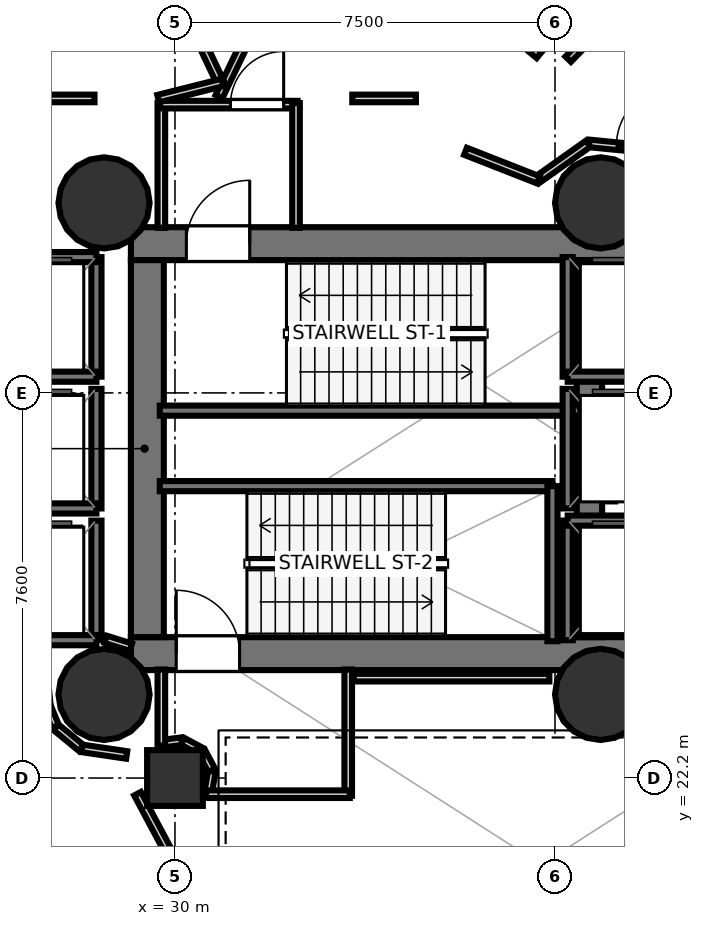
"""IFC4 building model, lengths in metres.
Left out: names, types, materials, properties, quantities, classifications, styles, units other than length and angle.
Written with IfcOpenShell. Run it as: python <this file> out.ifc"""

import sys

from ifc_helpers import new_model, si_unit, direction, frame, frame_2d, origin, origin_2d, place, context, subcontext, project, spatial, rectangle, hollow_circle, extrude, element, fill, save


model = new_model("IFC4")
c1 = context("Model", 3, precision=1e-05, world=origin(), true_north=direction((0.0, 1.0)))
c2 = subcontext(c1, "Body", "Model", "MODEL_VIEW")
j1 = project(units=[si_unit("LENGTHUNIT", "METRE"), si_unit("PLANEANGLEUNIT", "RADIAN")], contexts=[c1])
p1 = place(None, origin())
s1 = spatial("IfcSite", under=j1, at=p1, CompositionType="ELEMENT")
p2 = place(p1, origin())
s2 = spatial("IfcBuilding", under=s1, at=p2, CompositionType="ELEMENT")
p3 = place(p2, frame((0.0, 0.0, 6.0)))
s3 = spatial("IfcBuildingStorey", under=s2, at=p3, CompositionType="ELEMENT", Elevation=6.0)
p4 = place(p3, frame((29.13, 32.745, 0.0), z_axis=(0.0, 0.0, 1.0), x_axis=(1.0, 0.0, 0.0)))
e1 = element("IfcWall", 1, at=p4, inside=s3, PredefinedType="SHEAR", context=c2, shape_type="SweptSolid", body=[
    extrude(rectangle(XDim=10.72, YDim=0.65, at=frame_2d((5.36, 0.0))), origin(), (0.0, 0.0, 1.0), 4.78),
])
p5 = place(p4, frame((1.095, 0.0, 0.0)))
e2 = element("IfcOpeningElement", 2, at=p5, cuts=e1, PredefinedType="OPENING", context=c2, shape_type="SweptSolid", body=[
    extrude(rectangle(XDim=1.25, YDim=2.15, at=frame_2d((0.625, 1.075))), frame((0.0, 0.335, 0.0), z_axis=(0.0, -1.0, 0.0), x_axis=(1.0, 0.0, 0.0)), (0.0, 0.0, 1.0), 0.67),
])
p6 = place(p3, frame((29.13, 24.655, 0.0), z_axis=(0.0, 0.0, 1.0), x_axis=(1.0, 0.0, 0.0)))
e3 = element("IfcWall", 3, at=p6, inside=s3, PredefinedType="SHEAR", context=c2, shape_type="SweptSolid", body=[
    extrude(rectangle(XDim=10.72, YDim=0.65, at=frame_2d((5.36, 0.0))), origin(), (0.0, 0.0, 1.0), 4.78),
])
p7 = place(p6, frame((0.895, 0.0, 0.0)))
e4 = element("IfcOpeningElement", 4, at=p7, cuts=e3, PredefinedType="OPENING", context=c2, shape_type="SweptSolid", body=[
    extrude(rectangle(XDim=1.25, YDim=2.15, at=frame_2d((0.625, 1.075))), frame((0.0, 0.335, 0.0), z_axis=(0.0, -1.0, 0.0), x_axis=(1.0, 0.0, 0.0)), (0.0, 0.0, 1.0), 0.67),
])
p8 = place(p3, frame((29.455, 24.98, 0.0), z_axis=(0.0, 0.0, 1.0), x_axis=(0.0, 1.0, 0.0)))
e5 = element("IfcWall", 5, at=p8, inside=s3, PredefinedType="SHEAR", context=c2, shape_type="SweptSolid", body=[
    extrude(rectangle(XDim=7.44, YDim=0.65, at=frame_2d((3.72, 0.0))), origin(), (0.0, 0.0, 1.0), 4.78),
])
p9 = place(p3, frame((38.18, 24.98, 0.0), z_axis=(0.0, 0.0, 1.0), x_axis=(0.0, 1.0, 0.0)))
e6 = element("IfcWall", 6, at=p9, inside=s3, PredefinedType="SHEAR", context=c2, shape_type="SweptSolid", body=[
    extrude(rectangle(XDim=7.44, YDim=0.5, at=frame_2d((3.72, 0.0))), origin(), (0.0, 0.0, 1.0), 4.78),
])
for number, where, z_axis, x_axis in (
    (7, (28.6, 33.55, 0.0), (0.0, 0.0, 1.0), (1.0, 0.0, 0.0)),
    (8, (28.6, 23.85, 0.0), (0.0, 0.0, 1.0), (1.0, 0.0, 0.0)),
    (9, (38.4, 33.55, 0.0), (0.0, 0.0, 1.0), (1.0, 0.0, 0.0)),
    (10, (38.4, 23.85, 0.0), (0.0, 0.0, 1.0), (1.0, 0.0, 0.0)),
):
    element("IfcColumn", number, at=place(p3, frame(where, z_axis=z_axis, x_axis=x_axis)), inside=s3, PredefinedType="COLUMN", context=c2, shape_type="SweptSolid", body=[
        extrude(hollow_circle(Radius=0.9, WallThickness=0.045, at=origin_2d()), origin(), (0.0, 0.0, 1.0), 5.0),
    ])
p10 = place(p3, frame((30.0, 22.2, 0.0), z_axis=(0.0, 0.0, 1.0), x_axis=(1.0, 0.0, 0.0)))
e11 = element("IfcColumn", 11, at=p10, inside=s3, PredefinedType="COLUMN", context=c2, shape_type="SweptSolid", body=[
    extrude(rectangle(XDim=1.1, YDim=1.1, at=origin_2d()), origin(), (0.0, 0.0, 1.0), 5.0),
])
p11 = place(p3, frame((29.7, 29.45, 0.0), z_axis=(0.0, 0.0, 1.0), x_axis=(1.0, 0.0, 0.0)))
e12 = element("IfcWall", 12, at=p11, inside=s3, PredefinedType="SOLIDWALL", context=c2, shape_type="SweptSolid", body=[
    extrude(rectangle(XDim=8.3, YDim=0.2, at=frame_2d((4.15, 0.0))), origin(), (0.0, 0.0, 1.0), 4.78),
])
p12 = place(p3, frame((29.7, 27.96, 0.0), z_axis=(0.0, 0.0, 1.0), x_axis=(1.0, 0.0, 0.0)))
e13 = element("IfcWall", 13, at=p12, inside=s3, PredefinedType="SOLIDWALL", context=c2, shape_type="SweptSolid", body=[
    extrude(rectangle(XDim=7.75, YDim=0.2, at=frame_2d((3.875, 0.0))), origin(), (0.0, 0.0, 1.0), 4.78),
])
p13 = place(p3, frame((37.45, 24.9, 0.0), z_axis=(0.0, 0.0, 1.0), x_axis=(0.0, 1.0, 0.0)))
e14 = element("IfcWall", 14, at=p13, inside=s3, PredefinedType="SOLIDWALL", context=c2, shape_type="SweptSolid", body=[
    extrude(rectangle(XDim=3.06, YDim=0.2, at=frame_2d((1.53, 0.0))), origin(), (0.0, 0.0, 1.0), 4.78),
])
p14 = place(p3, frame((37.75, 30.12, 0.0), z_axis=(0.0, 0.0, 1.0), x_axis=(0.0, 1.0, 0.0)))
e15 = element("IfcWall", 15, at=p14, inside=s3, PredefinedType="SOLIDWALL", context=c2, shape_type="SweptSolid", body=[
    extrude(rectangle(XDim=2.36, YDim=0.2, at=frame_2d((1.18, 0.0))), origin(), (0.0, 0.0, 1.0), 4.78),
])
p15 = place(p3, frame((37.75, 30.12, 0.0), z_axis=(0.0, 0.0, 1.0), x_axis=(1.0, 0.0, 0.0)))
e16 = element("IfcWall", 16, at=p15, inside=s3, PredefinedType="SOLIDWALL", context=c2, shape_type="SweptSolid", body=[
    extrude(rectangle(XDim=2.1, YDim=0.2, at=frame_2d((1.05, 0.0))), origin(), (0.0, 0.0, 1.0), 4.78),
])
p16 = place(p3, frame((37.75, 24.92, 0.0), z_axis=(0.0, 0.0, 1.0), x_axis=(0.0, 1.0, 0.0)))
e17 = element("IfcWall", 17, at=p16, inside=s3, PredefinedType="SOLIDWALL", context=c2, shape_type="SweptSolid", body=[
    extrude(rectangle(XDim=2.36, YDim=0.2, at=frame_2d((1.18, 0.0))), origin(), (0.0, 0.0, 1.0), 4.78),
])
p17 = place(p3, frame((37.75, 27.28, 0.0), z_axis=(0.0, 0.0, 1.0), x_axis=(1.0, 0.0, 0.0)))
e18 = element("IfcWall", 18, at=p17, inside=s3, PredefinedType="SOLIDWALL", context=c2, shape_type="SweptSolid", body=[
    extrude(rectangle(XDim=2.1, YDim=0.2, at=frame_2d((1.05, 0.0))), origin(), (0.0, 0.0, 1.0), 4.78),
])
p18 = place(p3, frame((28.45, 30.12, 0.0), z_axis=(0.0, 0.0, 1.0), x_axis=(0.0, 1.0, 0.0)))
e19 = element("IfcWall", 19, at=p18, inside=s3, PredefinedType="SOLIDWALL", context=c2, shape_type="SweptSolid", body=[
    extrude(rectangle(XDim=2.36, YDim=0.2, at=frame_2d((1.18, 0.0))), origin(), (0.0, 0.0, 1.0), 4.78),
])
for number, where, z_axis, x_axis in (
    (20, (26.35, 32.48, 0.0), (0.0, 0.0, 1.0), (1.0, 0.0, 0.0)),
    (21, (26.35, 30.12, 0.0), (0.0, 0.0, 1.0), (1.0, 0.0, 0.0)),
):
    element("IfcWall", number, at=place(p3, frame(where, z_axis=z_axis, x_axis=x_axis)), inside=s3, PredefinedType="SOLIDWALL", context=c2, shape_type="SweptSolid", body=[
        extrude(rectangle(XDim=2.1, YDim=0.2, at=frame_2d((1.05, 0.0))), origin(), (0.0, 0.0, 1.0), 4.78),
    ])
p19 = place(p3, frame((28.45, 27.52, 0.0), z_axis=(0.0, 0.0, 1.0), x_axis=(0.0, 1.0, 0.0)))
e22 = element("IfcWall", 22, at=p19, inside=s3, PredefinedType="SOLIDWALL", context=c2, shape_type="SweptSolid", body=[
    extrude(rectangle(XDim=2.36, YDim=0.2, at=frame_2d((1.18, 0.0))), origin(), (0.0, 0.0, 1.0), 4.78),
])
p20 = place(p3, frame((26.35, 27.52, 0.0), z_axis=(0.0, 0.0, 1.0), x_axis=(1.0, 0.0, 0.0)))
e23 = element("IfcWall", 23, at=p20, inside=s3, PredefinedType="SOLIDWALL", context=c2, shape_type="SweptSolid", body=[
    extrude(rectangle(XDim=2.1, YDim=0.2, at=frame_2d((1.05, 0.0))), origin(), (0.0, 0.0, 1.0), 4.78),
])
p21 = place(p3, frame((28.45, 24.92, 0.0), z_axis=(0.0, 0.0, 1.0), x_axis=(0.0, 1.0, 0.0)))
e24 = element("IfcWall", 24, at=p21, inside=s3, PredefinedType="SOLIDWALL", context=c2, shape_type="SweptSolid", body=[
    extrude(rectangle(XDim=2.36, YDim=0.2, at=frame_2d((1.18, 0.0))), origin(), (0.0, 0.0, 1.0), 4.78),
])
p22 = place(p3, frame((26.35, 24.92, 0.0), z_axis=(0.0, 0.0, 1.0), x_axis=(1.0, 0.0, 0.0)))
e25 = element("IfcWall", 25, at=p22, inside=s3, PredefinedType="SOLIDWALL", context=c2, shape_type="SweptSolid", body=[
    extrude(rectangle(XDim=2.1, YDim=0.2, at=frame_2d((1.05, 0.0))), origin(), (0.0, 0.0, 1.0), 4.78),
])
p23 = place(p3, frame((37.75, 27.52, 0.0), z_axis=(0.0, 0.0, 1.0), x_axis=(0.0, 1.0, 0.0)))
e26 = element("IfcWall", 26, at=p23, inside=s3, PredefinedType="SOLIDWALL", context=c2, shape_type="SweptSolid", body=[
    extrude(rectangle(XDim=2.36, YDim=0.2, at=frame_2d((1.18, 0.0))), origin(), (0.0, 0.0, 1.0), 4.78),
])
p24 = place(p3, frame((29.731, 33.058, 0.0), z_axis=(0.0, 0.0, 1.0), x_axis=(0.0, 1.0, 0.0)))
e27 = element("IfcWall", 27, at=p24, inside=s3, PredefinedType="PARTITIONING", context=c2, shape_type="SweptSolid", body=[
    extrude(rectangle(XDim=2.462, YDim=0.15, at=frame_2d((1.231, 0.0))), origin(), (0.0, 0.0, 1.0), 4.1),
])
p25 = place(p3, frame((29.7, 35.489, 0.0), z_axis=(0.0, 0.0, 1.0), x_axis=(1.0, 0.0, 0.0)))
e28 = element("IfcWall", 28, at=p25, inside=s3, PredefinedType="PARTITIONING", context=c2, shape_type="SweptSolid", body=[
    extrude(rectangle(XDim=2.72, YDim=0.15, at=frame_2d((1.36, 0.0))), origin(), (0.0, 0.0, 1.0), 4.1),
])
p26 = place(p25, frame((1.395, 0.0, 0.0)))
e29 = element("IfcOpeningElement", 29, at=p26, cuts=e28, PredefinedType="OPENING", context=c2, shape_type="SweptSolid", body=[
    extrude(rectangle(XDim=1.05, YDim=2.15, at=frame_2d((0.525, 1.075))), frame((0.0, 0.085, 0.0), z_axis=(0.0, -1.0, 0.0), x_axis=(1.0, 0.0, 0.0)), (0.0, 0.0, 1.0), 0.17),
])
p27 = place(p3, frame((32.389, 35.52, 0.0), z_axis=(0.0, 0.0, 1.0), x_axis=(0.0, -1.0, 0.0)))
e30 = element("IfcWall", 30, at=p27, inside=s3, PredefinedType="PARTITIONING", context=c2, shape_type="SweptSolid", body=[
    extrude(rectangle(XDim=2.462, YDim=0.15, at=frame_2d((1.231, 0.0))), origin(), (0.0, 0.0, 1.0), 4.1),
])
p28 = place(p3, frame((30.645, 21.845, 0.0), z_axis=(0.0, 0.0, 1.0), x_axis=(0.16559769087, 0.986193391165, 0.0)))
e31 = element("IfcWall", 31, at=p28, inside=s3, PredefinedType="PARTITIONING", context=c2, shape_type="SweptSolid", body=[
    extrude(rectangle(XDim=0.495, YDim=0.15, at=frame_2d((0.248, 0.0))), origin(), (0.0, 0.0, 1.0), 4.1),
])
p29 = place(p3, frame((30.724, 22.353, 0.0), z_axis=(0.0, 0.0, 1.0), x_axis=(-0.471202615726, 0.882024996773, 0.0)))
e32 = element("IfcWall", 32, at=p29, inside=s3, PredefinedType="PARTITIONING", context=c2, shape_type="SweptSolid", body=[
    extrude(rectangle(XDim=0.412, YDim=0.15, at=frame_2d((0.206, 0.0))), origin(), (0.0, 0.0, 1.0), 4.1),
])
p30 = place(p3, frame((30.517, 22.729, 0.0), z_axis=(0.0, 0.0, 1.0), x_axis=(-0.882139655073, 0.470987928665, 0.0)))
e33 = element("IfcWall", 33, at=p30, inside=s3, PredefinedType="PARTITIONING", context=c2, shape_type="SweptSolid", body=[
    extrude(rectangle(XDim=0.412, YDim=0.15, at=frame_2d((0.206, 0.0))), origin(), (0.0, 0.0, 1.0), 4.1),
])
p31 = place(p3, frame((30.135, 22.927, 0.0), z_axis=(0.0, 0.0, 1.0), x_axis=(-0.992106976416, -0.125394367286, 0.0)))
e34 = element("IfcWall", 34, at=p31, inside=s3, PredefinedType="PARTITIONING", context=c2, shape_type="SweptSolid", body=[
    extrude(rectangle(XDim=0.442, YDim=0.15, at=frame_2d((0.221, 0.0))), origin(), (0.0, 0.0, 1.0), 4.1),
])
p32 = place(p3, frame((29.731, 22.841, 0.0), z_axis=(0.0, 0.0, 1.0), x_axis=(0.0, 1.0, 0.0)))
e35 = element("IfcWall", 35, at=p32, inside=s3, PredefinedType="PARTITIONING", context=c2, shape_type="SweptSolid", body=[
    extrude(rectangle(XDim=1.501, YDim=0.15, at=frame_2d((0.75, 0.0))), origin(), (0.0, 0.0, 1.0), 4.1),
])
p33 = place(p3, frame((33.419, 24.342, 0.0), z_axis=(0.0, 0.0, 1.0), x_axis=(0.0, -1.0, 0.0)))
e36 = element("IfcWall", 36, at=p33, inside=s3, PredefinedType="PARTITIONING", context=c2, shape_type="SweptSolid", body=[
    extrude(rectangle(XDim=2.492, YDim=0.15, at=frame_2d((1.246, 0.0))), origin(), (0.0, 0.0, 1.0), 4.1),
])
p34 = place(p3, frame((33.45, 21.881, 0.0), z_axis=(0.0, 0.0, 1.0), x_axis=(-1.0, 0.0, 0.0)))
e37 = element("IfcWall", 37, at=p34, inside=s3, PredefinedType="PARTITIONING", context=c2, shape_type="SweptSolid", body=[
    extrude(rectangle(XDim=2.836, YDim=0.15, at=frame_2d((1.418, 0.0))), origin(), (0.0, 0.0, 1.0), 4.1),
])
p35 = place(p3, frame((29.13, 24.782, 0.0), z_axis=(0.0, 0.0, 1.0), x_axis=(-0.955000482512, 0.296604245422, 0.0)))
e38 = element("IfcWall", 38, at=p35, inside=s3, PredefinedType="PARTITIONING", context=c2, shape_type="SweptSolid", body=[
    extrude(rectangle(XDim=0.524, YDim=0.15, at=frame_2d((0.262, 0.0))), origin(), (0.0, 0.0, 1.0), 4.1),
])
p36 = place(p3, frame((37.389, 24.181, 0.0), z_axis=(0.0, 0.0, 1.0), x_axis=(-1.0, 0.0, 0.0)))
e39 = element("IfcWall", 39, at=p36, inside=s3, PredefinedType="PARTITIONING", context=c2, shape_type="SweptSolid", body=[
    extrude(rectangle(XDim=3.859, YDim=0.15, at=frame_2d((1.929, 0.0))), origin(), (0.0, 0.0, 1.0), 4.1),
])
p37 = place(p3, frame((36.84, 36.748, 0.0), z_axis=(0.0, 0.0, 1.0), x_axis=(0.773032183029, -0.634366805564, 0.0)))
e40 = element("IfcWall", 40, at=p37, inside=s3, PredefinedType="PARTITIONING", context=c2, shape_type="SweptSolid", body=[
    extrude(rectangle(XDim=0.447, YDim=0.15, at=frame_2d((0.224, 0.0))), origin(), (0.0, 0.0, 1.0), 4.1),
])
p38 = place(p3, frame((37.76, 36.385, 0.0), z_axis=(0.0, 0.0, 1.0), x_axis=(0.698452825949, 0.715656097524, 0.0)))
e41 = element("IfcWall", 41, at=p38, inside=s3, PredefinedType="PARTITIONING", context=c2, shape_type="SweptSolid", body=[
    extrude(rectangle(XDim=0.922, YDim=0.15, at=frame_2d((0.461, 0.0))), origin(), (0.0, 0.0, 1.0), 4.1),
])
p39 = place(p3, frame((39.821, 34.561, 0.0), z_axis=(0.0, 0.0, 1.0), x_axis=(-0.995195288054, 0.09790984953, 0.0)))
e42 = element("IfcWall", 42, at=p39, inside=s3, PredefinedType="PARTITIONING", context=c2, shape_type="SweptSolid", body=[
    extrude(rectangle(XDim=1.653, YDim=0.15, at=frame_2d((0.827, 0.0))), origin(), (0.0, 0.0, 1.0), 4.1),
])
p40 = place(p3, frame((38.155, 34.718, 0.0), z_axis=(0.0, 0.0, 1.0), x_axis=(-0.815749774427, -0.578404966717, 0.0)))
e43 = element("IfcWall", 43, at=p40, inside=s3, PredefinedType="PARTITIONING", context=c2, shape_type="SweptSolid", body=[
    extrude(rectangle(XDim=1.24, YDim=0.15, at=frame_2d((0.62, 0.0))), origin(), (0.0, 0.0, 1.0), 4.1),
])
p41 = place(p3, frame((37.172, 34.004, 0.0), z_axis=(0.0, 0.0, 1.0), x_axis=(-0.930972145639, 0.36509021357, 0.0)))
e44 = element("IfcWall", 44, at=p41, inside=s3, PredefinedType="PARTITIONING", context=c2, shape_type="SweptSolid", body=[
    extrude(rectangle(XDim=1.545, YDim=0.15, at=frame_2d((0.773, 0.0))), origin(), (0.0, 0.0, 1.0), 4.1),
])
p42 = place(p3, frame((34.755, 35.611, 0.0), z_axis=(0.0, 0.0, 1.0), x_axis=(-1.0, 0.0, 0.0)))
e45 = element("IfcWall", 45, at=p42, inside=s3, PredefinedType="PARTITIONING", context=c2, shape_type="SweptSolid", body=[
    extrude(rectangle(XDim=1.255, YDim=0.15, at=frame_2d((0.628, 0.0))), origin(), (0.0, 0.0, 1.0), 4.1),
])
p43 = place(p3, frame((30.868, 35.646, 0.0), z_axis=(0.0, 0.0, 1.0), x_axis=(0.43338780703, 0.901207528108, 0.0)))
e46 = element("IfcWall", 46, at=p43, inside=s3, PredefinedType="PARTITIONING", context=c2, shape_type="SweptSolid", body=[
    extrude(rectangle(XDim=2.042, YDim=0.15, at=frame_2d((1.021, 0.0))), origin(), (0.0, 0.0, 1.0), 4.1),
])
p44 = place(p3, frame((30.157, 37.487, 0.0), z_axis=(0.0, 0.0, 1.0), x_axis=(0.427353044203, -0.904084827663, 0.0)))
e47 = element("IfcWall", 47, at=p44, inside=s3, PredefinedType="PARTITIONING", context=c2, shape_type="SweptSolid", body=[
    extrude(rectangle(XDim=1.775, YDim=0.15, at=frame_2d((0.887, 0.0))), origin(), (0.0, 0.0, 1.0), 4.1),
])
p45 = place(p3, frame((30.937, 35.926, 0.0), z_axis=(0.0, 0.0, 1.0), x_axis=(-0.969933389944, -0.243370538628, 0.0)))
e48 = element("IfcWall", 48, at=p45, inside=s3, PredefinedType="PARTITIONING", context=c2, shape_type="SweptSolid", body=[
    extrude(rectangle(XDim=1.307, YDim=0.15, at=frame_2d((0.654, 0.0))), origin(), (0.0, 0.0, 1.0), 4.1),
])
p46 = place(p3, frame((28.411, 35.611, 0.0), z_axis=(0.0, 0.0, 1.0), x_axis=(-1.0, 0.0, 0.0)))
e49 = element("IfcWall", 49, at=p46, inside=s3, PredefinedType="PARTITIONING", context=c2, shape_type="SweptSolid", body=[
    extrude(rectangle(XDim=1.561, YDim=0.15, at=frame_2d((0.781, 0.0))), origin(), (0.0, 0.0, 1.0), 4.1),
])
p47 = place(p3, frame((27.473, 23.62, 0.0), z_axis=(0.0, 0.0, 1.0), x_axis=(0.382631351728, -0.923901103298, 0.0)))
e50 = element("IfcWall", 50, at=p47, inside=s3, PredefinedType="PARTITIONING", context=c2, shape_type="SweptSolid", body=[
    extrude(rectangle(XDim=0.437, YDim=0.15, at=frame_2d((0.219, 0.0))), origin(), (0.0, 0.0, 1.0), 4.1),
])
p48 = place(p3, frame((27.649, 23.204, 0.0), z_axis=(0.0, 0.0, 1.0), x_axis=(0.772818338666, -0.634627304346, 0.0)))
e51 = element("IfcWall", 51, at=p48, inside=s3, PredefinedType="PARTITIONING", context=c2, shape_type="SweptSolid", body=[
    extrude(rectangle(XDim=0.65, YDim=0.15, at=frame_2d((0.325, 0.0))), origin(), (0.0, 0.0, 1.0), 4.1),
])
p49 = place(p3, frame((28.167, 22.785, 0.0), z_axis=(0.0, 0.0, 1.0), x_axis=(0.989291662385, -0.145952069991, 0.0)))
e52 = element("IfcWall", 52, at=p49, inside=s3, PredefinedType="PARTITIONING", context=c2, shape_type="SweptSolid", body=[
    extrude(rectangle(XDim=0.89, YDim=0.15, at=frame_2d((0.445, 0.0))), origin(), (0.0, 0.0, 1.0), 4.1),
])
p50 = place(p3, frame((29.261, 21.891, 0.0), z_axis=(0.0, 0.0, 1.0), x_axis=(0.471429586357, -0.881903705122, 0.0)))
e53 = element("IfcWall", 53, at=p50, inside=s3, PredefinedType="PARTITIONING", context=c2, shape_type="SweptSolid", body=[
    extrude(rectangle(XDim=2.003, YDim=0.15, at=frame_2d((1.001, 0.0))), origin(), (0.0, 0.0, 1.0), 4.1),
])
p51 = place(p3, frame((27.919, 20.397, 0.0), z_axis=(0.0, 0.0, 1.0), x_axis=(-0.932053116436, 0.362321663915, 0.0)))
e54 = element("IfcWall", 54, at=p51, inside=s3, PredefinedType="PARTITIONING", context=c2, shape_type="SweptSolid", body=[
    extrude(rectangle(XDim=1.135, YDim=0.15, at=frame_2d((0.567, 0.0))), origin(), (0.0, 0.0, 1.0), 4.1),
])
p52 = place(p5, origin())
e55 = element("IfcDoor", 55, at=p52, inside=s3, OperationType="SINGLE_SWING_RIGHT", PredefinedType="DOOR", context=c2, shape_type="SweptSolid", body=[
    extrude(rectangle(XDim=1.25, YDim=2.15, at=frame_2d((0.625, 1.075))), frame((0.0, 0.025, 0.0), z_axis=(0.0, -1.0, 0.0), x_axis=(1.0, 0.0, 0.0)), (0.0, 0.0, 1.0), 0.05),
])
fill(e2, e55)
p53 = place(p7, origin())
e56 = element("IfcDoor", 56, at=p53, inside=s3, OperationType="SINGLE_SWING_LEFT", PredefinedType="DOOR", context=c2, shape_type="SweptSolid", body=[
    extrude(rectangle(XDim=1.25, YDim=2.15, at=frame_2d((0.625, 1.075))), frame((0.0, 0.025, 0.0), z_axis=(0.0, -1.0, 0.0), x_axis=(1.0, 0.0, 0.0)), (0.0, 0.0, 1.0), 0.05),
])
fill(e4, e56)
p54 = place(p26, origin())
e57 = element("IfcDoor", 57, at=p54, inside=s3, OperationType="SINGLE_SWING_RIGHT", PredefinedType="DOOR", context=c2, shape_type="SweptSolid", body=[
    extrude(rectangle(XDim=1.05, YDim=2.15, at=frame_2d((0.525, 1.075))), frame((0.0, 0.025, 0.0), z_axis=(0.0, -1.0, 0.0), x_axis=(1.0, 0.0, 0.0)), (0.0, 0.0, 1.0), 0.05),
])
fill(e29, e57)
save(model, sys.argv[1])
